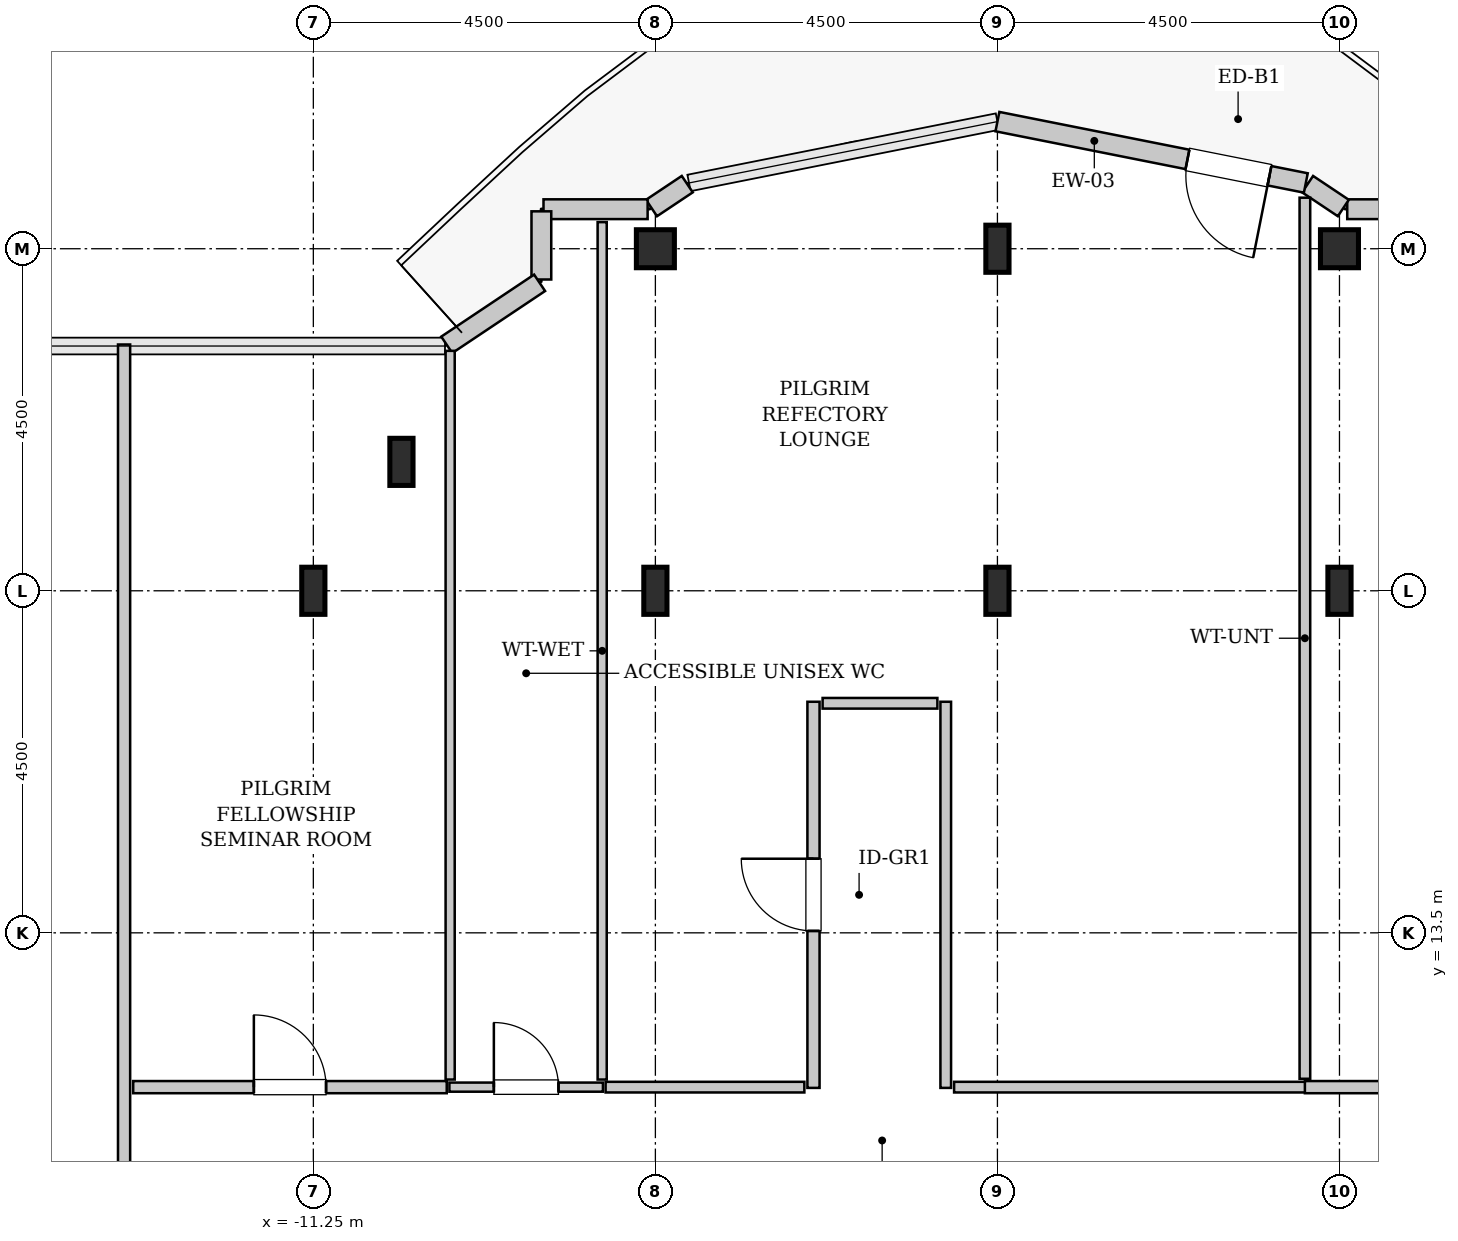
"""IFC4 building model, lengths in metres.
Left out: names, types, materials, properties, quantities, classifications, styles, units other than length and angle.
Written with IfcOpenShell. Run it as: python <this file> out.ifc"""

import sys

from ifc_helpers import new_model, si_unit, direction, frame, frame_2d, origin, origin_2d, place, context, subcontext, project, spatial, rectangle, hollow_rectangle, i_section, extrude, source, transform, mapped, element, fill, save


model = new_model("IFC4")
c1 = context("Model", 3, precision=1e-05, world=origin(), true_north=direction((0.0, 1.0)))
c2 = subcontext(c1, "Body", "Model", "MODEL_VIEW")
j1 = project(units=[si_unit("LENGTHUNIT", "METRE"), si_unit("PLANEANGLEUNIT", "RADIAN")], contexts=[c1])
p1 = place(None, origin())
s1 = spatial("IfcSite", under=j1, at=p1, CompositionType="ELEMENT")
p2 = place(p1, origin())
s2 = spatial("IfcBuilding", under=s1, at=p2, CompositionType="ELEMENT")
p3 = place(p2, frame((0.0, 0.0, 326.2)))
s3 = spatial("IfcBuildingStorey", under=s2, at=p3, CompositionType="ELEMENT", Elevation=326.2)
m1 = source(origin(), c2, "Body", "SweptSolid", [
    extrude(i_section(OverallWidth=0.305, OverallDepth=0.62, WebThickness=0.021, FlangeThickness=0.04, FilletRadius=0.027, at=origin_2d()), origin(), (0.0, 0.0, 1.0), 3.8),
])
for number, where, z_axis, x_axis in (
    (1, (-11.25, 18.0, 0.0), (0.0, 0.0, 1.0), (1.0, 0.0, 0.0)),
    (2, (-10.091, 19.696, 0.0), (0.0, 0.0, 1.0), (1.0, 0.0, 0.0)),
    (3, (-6.75, 18.0, 0.0), (0.0, 0.0, 1.0), (1.0, 0.0, 0.0)),
):
    element("IfcColumn", number, at=place(p3, frame(where, z_axis=z_axis, x_axis=x_axis)), inside=s3, PredefinedType="COLUMN", context=c2, shape_type="MappedRepresentation", body=[
        mapped(m1, transform((0.0, 0.0, 0.0), x_axis=(1.0, 0.0, 0.0), y_axis=(0.0, 1.0, 0.0), z_axis=(0.0, 0.0, 1.0), scale=1.0)),
    ])
m2 = source(origin(), c2, "Body", "SweptSolid", [
    extrude(hollow_rectangle(XDim=0.5, YDim=0.5, WallThickness=0.025, InnerFilletRadius=0.025, OuterFilletRadius=0.05, at=origin_2d()), origin(), (0.0, 0.0, 1.0), 3.8),
])
p4 = place(p3, frame((-6.75, 22.5, 0.0), z_axis=(0.0, 0.0, 1.0), x_axis=(1.0, 0.0, 0.0)))
e4 = element("IfcColumn", 4, at=p4, inside=s3, PredefinedType="COLUMN", context=c2, shape_type="MappedRepresentation", body=[
    mapped(m2, transform((0.0, 0.0, 0.0), x_axis=(1.0, 0.0, 0.0), y_axis=(0.0, 1.0, 0.0), z_axis=(0.0, 0.0, 1.0), scale=1.0)),
])
for number, where, z_axis, x_axis in (
    (5, (-2.25, 18.0, 0.0), (0.0, 0.0, 1.0), (1.0, 0.0, 0.0)),
    (6, (-2.25, 22.5, 0.0), (0.0, 0.0, 1.0), (1.0, 0.0, 0.0)),
    (7, (2.25, 18.0, 0.0), (0.0, 0.0, 1.0), (1.0, 0.0, 0.0)),
):
    element("IfcColumn", number, at=place(p3, frame(where, z_axis=z_axis, x_axis=x_axis)), inside=s3, PredefinedType="COLUMN", context=c2, shape_type="MappedRepresentation", body=[
        mapped(m1, transform((0.0, 0.0, 0.0), x_axis=(1.0, 0.0, 0.0), y_axis=(0.0, 1.0, 0.0), z_axis=(0.0, 0.0, 1.0), scale=1.0)),
    ])
p5 = place(p3, frame((2.25, 22.5, 0.0), z_axis=(0.0, 0.0, 1.0), x_axis=(1.0, 0.0, 0.0)))
e8 = element("IfcColumn", 8, at=p5, inside=s3, PredefinedType="COLUMN", context=c2, shape_type="MappedRepresentation", body=[
    mapped(m2, transform((0.0, 0.0, 0.0), x_axis=(1.0, 0.0, 0.0), y_axis=(0.0, 1.0, 0.0), z_axis=(0.0, 0.0, 1.0), scale=1.0)),
])
m3 = source(origin(), c2, "Body", "SweptSolid", [
    extrude(rectangle(XDim=1.37, YDim=0.26, at=frame_2d((0.685, 0.0))), origin(), (0.0, 0.0, 1.0), 3.55),
])
p6 = place(p3, frame((3.722, 23.02, 0.0), z_axis=(0.0, 0.0, 1.0), x_axis=(-1.0, 0.0, 0.0)))
e9 = element("IfcWall", 9, at=p6, inside=s3, PredefinedType="SOLIDWALL", context=c2, shape_type="MappedRepresentation", body=[
    mapped(m3, transform((0.0, 0.0, 0.0), x_axis=(1.0, 0.0, 0.0), y_axis=(0.0, 1.0, 0.0), z_axis=(0.0, 0.0, 1.0), scale=1.0)),
])
m4 = source(origin(), c2, "Body", "SweptSolid", [
    extrude(rectangle(XDim=0.565, YDim=0.26, at=frame_2d((0.283, 0.0))), origin(), (0.0, 0.0, 1.0), 3.55),
])
p7 = place(p3, frame((2.301, 23.036, 0.0), z_axis=(0.0, 0.0, 1.0), x_axis=(-0.831651492666, 0.555297933317, 0.0)))
e10 = element("IfcWall", 10, at=p7, inside=s3, PredefinedType="SOLIDWALL", context=c2, shape_type="MappedRepresentation", body=[
    mapped(m4, transform((0.0, 0.0, 0.0), x_axis=(1.0, 0.0, 0.0), y_axis=(0.0, 1.0, 0.0), z_axis=(0.0, 0.0, 1.0), scale=1.0)),
])
m5 = source(origin(), c2, "Body", "SweptSolid", [
    extrude(rectangle(XDim=4.137, YDim=0.26, at=frame_2d((2.068, 0.0))), origin(), (0.0, 0.0, 1.0), 3.55),
])
p8 = place(p3, frame((1.807, 23.365, 0.0), z_axis=(0.0, 0.0, 1.0), x_axis=(-0.980782170794, 0.195105954428, 0.0)))
e11 = element("IfcWall", 11, at=p8, inside=s3, PredefinedType="SOLIDWALL", context=c2, shape_type="MappedRepresentation", body=[
    mapped(m5, transform((0.0, 0.0, 0.0), x_axis=(1.0, 0.0, 0.0), y_axis=(0.0, 1.0, 0.0), z_axis=(0.0, 0.0, 1.0), scale=1.0)),
])
p9 = place(p8, frame((0.488, 0.0, 0.0)))
e12 = element("IfcOpeningElement", 12, at=p9, cuts=e11, PredefinedType="OPENING", context=c2, shape_type="SweptSolid", body=[
    extrude(rectangle(XDim=1.1, YDim=2.2, at=frame_2d((0.55, 1.1))), frame((0.0, 0.14, 0.0), z_axis=(0.0, -1.0, 0.0), x_axis=(1.0, 0.0, 0.0)), (0.0, 0.0, 1.0), 0.28),
])
p10 = place(p3, frame((-6.331, 23.35, 0.0), z_axis=(0.0, 0.0, 1.0), x_axis=(-0.831651492666, -0.555297933317, 0.0)))
e13 = element("IfcWall", 13, at=p10, inside=s3, PredefinedType="SOLIDWALL", context=c2, shape_type="MappedRepresentation", body=[
    mapped(m4, transform((0.0, 0.0, 0.0), x_axis=(1.0, 0.0, 0.0), y_axis=(0.0, 1.0, 0.0), z_axis=(0.0, 0.0, 1.0), scale=1.0)),
])
p11 = place(p3, frame((-6.852, 23.02, 0.0), z_axis=(0.0, 0.0, 1.0), x_axis=(-1.0, 0.0, 0.0)))
e14 = element("IfcWall", 14, at=p11, inside=s3, PredefinedType="SOLIDWALL", context=c2, shape_type="MappedRepresentation", body=[
    mapped(m3, transform((0.0, 0.0, 0.0), x_axis=(1.0, 0.0, 0.0), y_axis=(0.0, 1.0, 0.0), z_axis=(0.0, 0.0, 1.0), scale=1.0)),
])
m6 = source(origin(), c2, "Body", "SweptSolid", [
    extrude(rectangle(XDim=0.897, YDim=0.26, at=frame_2d((0.448, 0.0))), origin(), (0.0, 0.0, 1.0), 3.55),
])
p12 = place(p3, frame((-8.25, 22.992, 0.0), z_axis=(0.0, 0.0, 1.0), x_axis=(0.0, -1.0, 0.0)))
e15 = element("IfcWall", 15, at=p12, inside=s3, PredefinedType="SOLIDWALL", context=c2, shape_type="MappedRepresentation", body=[
    mapped(m6, transform((0.0, 0.0, 0.0), x_axis=(1.0, 0.0, 0.0), y_axis=(0.0, 1.0, 0.0), z_axis=(0.0, 0.0, 1.0), scale=1.0)),
])
m7 = source(origin(), c2, "Body", "SweptSolid", [
    extrude(rectangle(XDim=1.469, YDim=0.26, at=frame_2d((0.734, 0.0))), origin(), (0.0, 0.0, 1.0), 3.55),
])
p13 = place(p3, frame((-8.273, 22.052, 0.0), z_axis=(0.0, 0.0, 1.0), x_axis=(-0.831461760506, -0.555581983884, 0.0)))
e16 = element("IfcWall", 16, at=p13, inside=s3, PredefinedType="SOLIDWALL", context=c2, shape_type="MappedRepresentation", body=[
    mapped(m7, transform((0.0, 0.0, 0.0), x_axis=(1.0, 0.0, 0.0), y_axis=(0.0, 1.0, 0.0), z_axis=(0.0, 0.0, 1.0), scale=1.0)),
])
m8 = source(origin(), c2, "Body", "SweptSolid", [
    extrude(rectangle(XDim=2.02, YDim=0.12, at=frame_2d((1.01, 0.0))), origin(), (0.0, 0.0, 1.0), 3.535),
])
p14 = place(p3, frame((-9.46, 11.47, 0.0), z_axis=(0.0, 0.0, 1.0), x_axis=(1.0, 0.0, 0.0)))
e17 = element("IfcWall", 17, at=p14, inside=s3, PredefinedType="PLUMBINGWALL", context=c2, shape_type="MappedRepresentation", body=[
    mapped(m8, transform((0.0, 0.0, 0.0), x_axis=(1.0, 0.0, 0.0), y_axis=(0.0, 1.0, 0.0), z_axis=(0.0, 0.0, 1.0), scale=1.0)),
])
p15 = place(p14, frame((0.585, 0.0, 0.0)))
e18 = element("IfcOpeningElement", 18, at=p15, cuts=e17, PredefinedType="OPENING", context=c2, shape_type="SweptSolid", body=[
    extrude(rectangle(XDim=0.85, YDim=2.1, at=frame_2d((0.425, 1.05))), frame((0.0, 0.07, 0.0), z_axis=(0.0, -1.0, 0.0), x_axis=(1.0, 0.0, 0.0)), (0.0, 0.0, 1.0), 0.14),
])
m9 = source(origin(), c2, "Body", "SweptSolid", [
    extrude(rectangle(XDim=11.28, YDim=0.12, at=frame_2d((5.64, 0.0))), origin(), (0.0, 0.0, 1.0), 3.535),
])
p16 = place(p3, frame((-7.45, 11.57, 0.0), z_axis=(0.0, 0.0, 1.0), x_axis=(0.0, 1.0, 0.0)))
e19 = element("IfcWall", 19, at=p16, inside=s3, PredefinedType="PLUMBINGWALL", context=c2, shape_type="MappedRepresentation", body=[
    mapped(m9, transform((0.0, 0.0, 0.0), x_axis=(1.0, 0.0, 0.0), y_axis=(0.0, 1.0, 0.0), z_axis=(0.0, 0.0, 1.0), scale=1.0)),
])
m10 = source(origin(), c2, "Body", "SweptSolid", [
    extrude(rectangle(XDim=9.587, YDim=0.12, at=frame_2d((4.793, 0.0))), origin(), (0.0, 0.0, 1.0), 3.535),
])
p17 = place(p3, frame((-9.45, 11.57, 0.0), z_axis=(0.0, 0.0, 1.0), x_axis=(0.0, 1.0, 0.0)))
e20 = element("IfcWall", 20, at=p17, inside=s3, PredefinedType="PLUMBINGWALL", context=c2, shape_type="MappedRepresentation", body=[
    mapped(m10, transform((0.0, 0.0, 0.0), x_axis=(1.0, 0.0, 0.0), y_axis=(0.0, 1.0, 0.0), z_axis=(0.0, 0.0, 1.0), scale=1.0)),
])
m11 = source(origin(), c2, "Body", "SweptSolid", [
    extrude(rectangle(XDim=15.045, YDim=0.16, at=frame_2d((7.522, 0.0))), origin(), (0.0, 0.0, 1.0), 3.535),
])
p18 = place(p3, frame((-13.74, 6.195, 0.0), z_axis=(0.0, 0.0, 1.0), x_axis=(0.0, 1.0, 0.0)))
e21 = element("IfcWall", 21, at=p18, inside=s3, PredefinedType="PARTITIONING", context=c2, shape_type="MappedRepresentation", body=[
    mapped(m11, transform((0.0, 0.0, 0.0), x_axis=(1.0, 0.0, 0.0), y_axis=(0.0, 1.0, 0.0), z_axis=(0.0, 0.0, 1.0), scale=1.0)),
])
p19 = place(p18, frame((2.183, 0.0, 0.0)))
e22 = element("IfcOpeningElement", 22, at=p19, cuts=e21, PredefinedType="OPENING", context=c2, shape_type="SweptSolid", body=[
    extrude(rectangle(XDim=0.95, YDim=2.1, at=frame_2d((0.475, 1.05))), frame((0.0, 0.09, 0.0), z_axis=(0.0, -1.0, 0.0), x_axis=(1.0, 0.0, 0.0)), (0.0, 0.0, 1.0), 0.18),
])
m12 = source(origin(), c2, "Body", "SweptSolid", [
    extrude(rectangle(XDim=4.125, YDim=0.16, at=frame_2d((2.062, 0.0))), origin(), (0.0, 0.0, 1.0), 3.535),
])
p20 = place(p3, frame((-13.62, 11.47, 0.0), z_axis=(0.0, 0.0, 1.0), x_axis=(1.0, 0.0, 0.0)))
e23 = element("IfcWall", 23, at=p20, inside=s3, PredefinedType="PARTITIONING", context=c2, shape_type="MappedRepresentation", body=[
    mapped(m12, transform((0.0, 0.0, 0.0), x_axis=(1.0, 0.0, 0.0), y_axis=(0.0, 1.0, 0.0), z_axis=(0.0, 0.0, 1.0), scale=1.0)),
])
p21 = place(p20, frame((1.587, 0.0, 0.0)))
e24 = element("IfcOpeningElement", 24, at=p21, cuts=e23, PredefinedType="OPENING", context=c2, shape_type="SweptSolid", body=[
    extrude(rectangle(XDim=0.95, YDim=2.1, at=frame_2d((0.475, 1.05))), frame((0.0, 0.09, 0.0), z_axis=(0.0, -1.0, 0.0), x_axis=(1.0, 0.0, 0.0)), (0.0, 0.0, 1.0), 0.18),
])
m13 = source(origin(), c2, "Body", "SweptSolid", [
    extrude(rectangle(XDim=5.08, YDim=0.16, at=frame_2d((2.54, 0.0))), origin(), (0.0, 0.0, 1.0), 3.535),
])
p22 = place(p3, frame((-4.67, 11.46, 0.0), z_axis=(0.0, 0.0, 1.0), x_axis=(0.0, 1.0, 0.0)))
e25 = element("IfcWall", 25, at=p22, inside=s3, PredefinedType="PARTITIONING", context=c2, shape_type="MappedRepresentation", body=[
    mapped(m13, transform((0.0, 0.0, 0.0), x_axis=(1.0, 0.0, 0.0), y_axis=(0.0, 1.0, 0.0), z_axis=(0.0, 0.0, 1.0), scale=1.0)),
])
p23 = place(p22, frame((2.065, 0.0, 0.0)))
e26 = element("IfcOpeningElement", 26, at=p23, cuts=e25, PredefinedType="OPENING", context=c2, shape_type="SweptSolid", body=[
    extrude(rectangle(XDim=0.95, YDim=2.1, at=frame_2d((0.475, 1.05))), frame((0.0, 0.09, 0.0), z_axis=(0.0, -1.0, 0.0), x_axis=(1.0, 0.0, 0.0)), (0.0, 0.0, 1.0), 0.18),
])
m14 = source(origin(), c2, "Body", "SweptSolid", [
    extrude(rectangle(XDim=5.08, YDim=0.14, at=frame_2d((2.54, 0.0))), origin(), (0.0, 0.0, 1.0), 3.535),
])
p24 = place(p3, frame((-2.93, 11.46, 0.0), z_axis=(0.0, 0.0, 1.0), x_axis=(0.0, 1.0, 0.0)))
e27 = element("IfcWall", 27, at=p24, inside=s3, PredefinedType="PARTITIONING", context=c2, shape_type="MappedRepresentation", body=[
    mapped(m14, transform((0.0, 0.0, 0.0), x_axis=(1.0, 0.0, 0.0), y_axis=(0.0, 1.0, 0.0), z_axis=(0.0, 0.0, 1.0), scale=1.0)),
])
m15 = source(origin(), c2, "Body", "SweptSolid", [
    extrude(rectangle(XDim=4.625, YDim=0.14, at=frame_2d((2.312, 0.0))), origin(), (0.0, 0.0, 1.0), 3.535),
])
p25 = place(p3, frame((-2.82, 11.47, 0.0), z_axis=(0.0, 0.0, 1.0), x_axis=(1.0, 0.0, 0.0)))
e28 = element("IfcWall", 28, at=p25, inside=s3, PredefinedType="PARTITIONING", context=c2, shape_type="MappedRepresentation", body=[
    mapped(m15, transform((0.0, 0.0, 0.0), x_axis=(1.0, 0.0, 0.0), y_axis=(0.0, 1.0, 0.0), z_axis=(0.0, 0.0, 1.0), scale=1.0)),
])
m16 = source(origin(), c2, "Body", "SweptSolid", [
    extrude(rectangle(XDim=2.615, YDim=0.14, at=frame_2d((1.308, 0.0))), origin(), (0.0, 0.0, 1.0), 3.535),
])
p26 = place(p3, frame((-7.405, 11.47, 0.0), z_axis=(0.0, 0.0, 1.0), x_axis=(1.0, 0.0, 0.0)))
e29 = element("IfcWall", 29, at=p26, inside=s3, PredefinedType="PARTITIONING", context=c2, shape_type="MappedRepresentation", body=[
    mapped(m16, transform((0.0, 0.0, 0.0), x_axis=(1.0, 0.0, 0.0), y_axis=(0.0, 1.0, 0.0), z_axis=(0.0, 0.0, 1.0), scale=1.0)),
])
m17 = source(origin(), c2, "Body", "SweptSolid", [
    extrude(rectangle(XDim=1.51, YDim=0.14, at=frame_2d((0.755, 0.0))), origin(), (0.0, 0.0, 1.0), 3.535),
])
p27 = place(p3, frame((-4.55, 16.52, 0.0), z_axis=(0.0, 0.0, 1.0), x_axis=(1.0, 0.0, 0.0)))
e30 = element("IfcWall", 30, at=p27, inside=s3, PredefinedType="PARTITIONING", context=c2, shape_type="MappedRepresentation", body=[
    mapped(m17, transform((0.0, 0.0, 0.0), x_axis=(1.0, 0.0, 0.0), y_axis=(0.0, 1.0, 0.0), z_axis=(0.0, 0.0, 1.0), scale=1.0)),
])
m18 = source(origin(), c2, "Body", "SweptSolid", [
    extrude(rectangle(XDim=11.591, YDim=0.14, at=frame_2d((5.796, 0.0))), origin(), (0.0, 0.0, 1.0), 2.975),
])
p28 = place(p3, frame((1.795, 11.58, 0.0), z_axis=(0.0, 0.0, 1.0), x_axis=(0.0, 1.0, 0.0)))
e31 = element("IfcWall", 31, at=p28, inside=s3, PredefinedType="PARTITIONING", context=c2, shape_type="MappedRepresentation", body=[
    mapped(m18, transform((0.0, 0.0, 0.0), x_axis=(1.0, 0.0, 0.0), y_axis=(0.0, 1.0, 0.0), z_axis=(0.0, 0.0, 1.0), scale=1.0)),
])
m19 = source(origin(), c2, "Body", "SweptSolid", [
    extrude(rectangle(XDim=5.965, YDim=0.16, at=frame_2d((2.982, 0.0))), origin(), (0.0, 0.0, 1.0), 3.535),
])
p29 = place(p3, frame((1.795, 11.47, 0.0), z_axis=(0.0, 0.0, 1.0), x_axis=(1.0, 0.0, 0.0)))
e32 = element("IfcWall", 32, at=p29, inside=s3, PredefinedType="PARTITIONING", context=c2, shape_type="MappedRepresentation", body=[
    mapped(m19, transform((0.0, 0.0, 0.0), x_axis=(1.0, 0.0, 0.0), y_axis=(0.0, 1.0, 0.0), z_axis=(0.0, 0.0, 1.0), scale=1.0)),
])
p30 = place(p29, frame((2.508, 0.0, 0.0)))
e33 = element("IfcOpeningElement", 33, at=p30, cuts=e32, PredefinedType="OPENING", context=c2, shape_type="SweptSolid", body=[
    extrude(rectangle(XDim=0.95, YDim=2.1, at=frame_2d((0.475, 1.05))), frame((0.0, 0.09, 0.0), z_axis=(0.0, -1.0, 0.0), x_axis=(1.0, 0.0, 0.0)), (0.0, 0.0, 1.0), 0.18),
])
m20 = source(origin(), c2, "Body", "SweptSolid", [
    extrude(rectangle(XDim=1.1, YDim=2.2, at=frame_2d((0.55, 1.1))), frame((0.0, 0.025, 0.0), z_axis=(0.0, -1.0, 0.0), x_axis=(1.0, 0.0, 0.0)), (0.0, 0.0, 1.0), 0.05),
])
p31 = place(p9, origin())
e34 = element("IfcDoor", 34, at=p31, inside=s3, OperationType="SINGLE_SWING_LEFT", PredefinedType="DOOR", context=c2, shape_type="MappedRepresentation", body=[
    mapped(m20, transform((0.0, 0.0, 0.0), x_axis=(1.0, 0.0, 0.0), y_axis=(0.0, 1.0, 0.0), z_axis=(0.0, 0.0, 1.0), scale=1.0)),
])
fill(e12, e34)
m21 = source(origin(), c2, "Body", "SweptSolid", [
    extrude(rectangle(XDim=0.85, YDim=2.1, at=frame_2d((0.425, 1.05))), frame((0.0, 0.025, 0.0), z_axis=(0.0, -1.0, 0.0), x_axis=(1.0, 0.0, 0.0)), (0.0, 0.0, 1.0), 0.05),
])
p32 = place(p15, origin())
e35 = element("IfcDoor", 35, at=p32, inside=s3, OperationType="SINGLE_SWING_LEFT", PredefinedType="DOOR", context=c2, shape_type="MappedRepresentation", body=[
    mapped(m21, transform((0.0, 0.0, 0.0), x_axis=(1.0, 0.0, 0.0), y_axis=(0.0, 1.0, 0.0), z_axis=(0.0, 0.0, 1.0), scale=1.0)),
])
fill(e18, e35)
m22 = source(origin(), c2, "Body", "SweptSolid", [
    extrude(rectangle(XDim=0.95, YDim=2.1, at=frame_2d((0.475, 1.05))), frame((0.0, 0.025, 0.0), z_axis=(0.0, -1.0, 0.0), x_axis=(1.0, 0.0, 0.0)), (0.0, 0.0, 1.0), 0.05),
])
p33 = place(p21, origin())
e36 = element("IfcDoor", 36, at=p33, inside=s3, OperationType="SINGLE_SWING_LEFT", PredefinedType="DOOR", context=c2, shape_type="MappedRepresentation", body=[
    mapped(m22, transform((0.0, 0.0, 0.0), x_axis=(1.0, 0.0, 0.0), y_axis=(0.0, 1.0, 0.0), z_axis=(0.0, 0.0, 1.0), scale=1.0)),
])
fill(e24, e36)
p34 = place(p23, origin())
e37 = element("IfcDoor", 37, at=p34, inside=s3, OperationType="SINGLE_SWING_RIGHT", PredefinedType="DOOR", context=c2, shape_type="MappedRepresentation", body=[
    mapped(m22, transform((0.0, 0.0, 0.0), x_axis=(1.0, 0.0, 0.0), y_axis=(0.0, 1.0, 0.0), z_axis=(0.0, 0.0, 1.0), scale=1.0)),
])
fill(e26, e37)
save(model, sys.argv[1])
